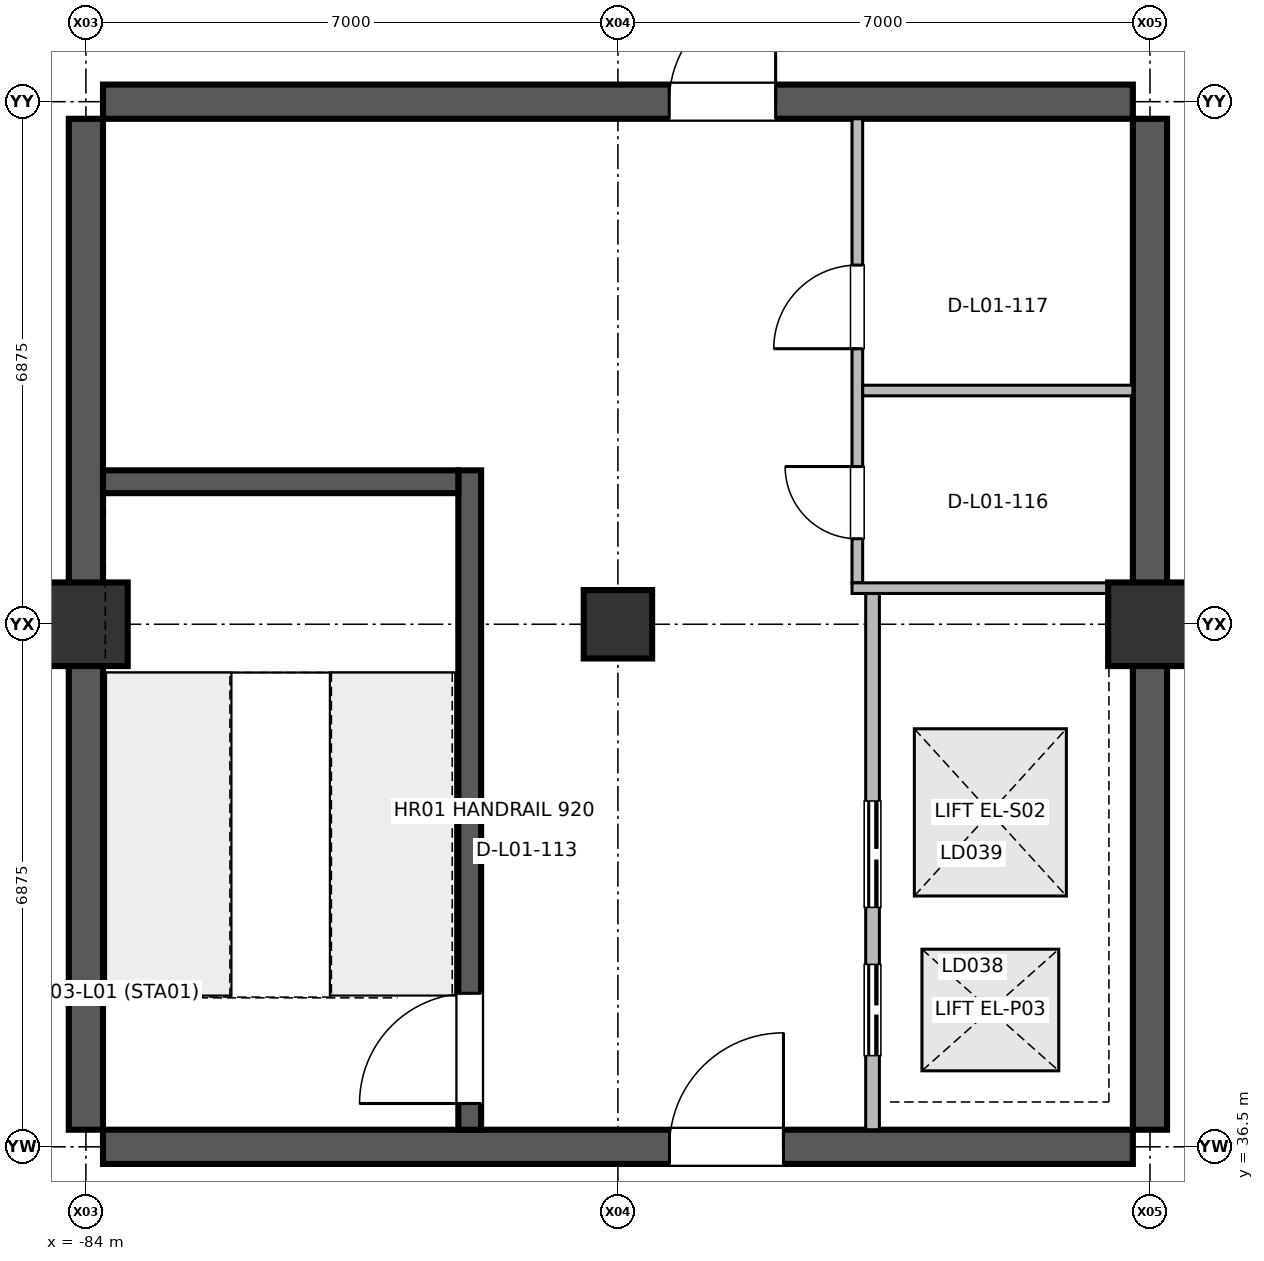
"""IFC4 building model, lengths in metres.
Left out: names, types, materials, properties, quantities, classifications, styles, units other than length and angle.
Written with IfcOpenShell. Run it as: python <this file> out.ifc"""

import sys

from ifc_helpers import new_model, si_unit, direction, frame, frame_2d, origin, origin_2d, place, context, subcontext, project, spatial, rectangle, extrude, element, fill, save


model = new_model("IFC4")
c1 = context("Model", 3, precision=1e-05, world=origin(), true_north=direction((0.0, 1.0)))
c2 = subcontext(c1, "Body", "Model", "MODEL_VIEW")
j1 = project(units=[si_unit("LENGTHUNIT", "METRE"), si_unit("PLANEANGLEUNIT", "RADIAN")], contexts=[c1])
p1 = place(None, origin())
s1 = spatial("IfcSite", under=j1, at=p1, CompositionType="ELEMENT")
p2 = place(p1, origin())
s2 = spatial("IfcBuilding", under=s1, at=p2, CompositionType="ELEMENT")
p3 = place(p2, origin())
s3 = spatial("IfcBuildingStorey", under=s2, at=p3, CompositionType="ELEMENT", Elevation=0.0)
p4 = place(p3, frame((-84.0, 43.375, 0.0), z_axis=(0.0, 0.0, 1.0), x_axis=(1.0, 0.0, 0.0)))
e1 = element("IfcColumn", 1, at=p4, inside=s3, PredefinedType="COLUMN", context=c2, shape_type="SweptSolid", body=[
    extrude(rectangle(XDim=1.1, YDim=1.1, at=origin_2d()), origin(), (0.0, 0.0, 1.0), 5.998),
])
p5 = place(p3, frame((-77.0, 43.375, 0.0), z_axis=(0.0, 0.0, 1.0), x_axis=(1.0, 0.0, 0.0)))
e2 = element("IfcColumn", 2, at=p5, inside=s3, PredefinedType="COLUMN", context=c2, shape_type="SweptSolid", body=[
    extrude(rectangle(XDim=0.9, YDim=0.9, at=origin_2d()), origin(), (0.0, 0.0, 1.0), 5.998),
])
p6 = place(p3, frame((-70.0, 43.375, 0.0), z_axis=(0.0, 0.0, 1.0), x_axis=(1.0, 0.0, 0.0)))
e3 = element("IfcColumn", 3, at=p6, inside=s3, PredefinedType="COLUMN", context=c2, shape_type="SweptSolid", body=[
    extrude(rectangle(XDim=1.1, YDim=1.1, at=origin_2d()), origin(), (0.0, 0.0, 1.0), 5.998),
])
for number, where, z_axis, x_axis in (
    (4, (-84.0, 36.725, 0.0), (0.0, 0.0, 1.0), (0.0, 1.0, 0.0)),
    (5, (-70.0, 36.725, 0.0), (0.0, 0.0, 1.0), (0.0, 1.0, 0.0)),
):
    element("IfcWall", number, at=place(p3, frame(where, z_axis=z_axis, x_axis=x_axis)), inside=s3, PredefinedType="SHEAR", context=c2, shape_type="SweptSolid", body=[
        extrude(rectangle(XDim=13.3, YDim=0.45, at=frame_2d((6.65, 0.0))), origin(), (0.0, 0.0, 1.0), 5.78),
    ])
p7 = place(p3, frame((-83.775, 36.5, 0.0), z_axis=(0.0, 0.0, 1.0), x_axis=(1.0, 0.0, 0.0)))
e6 = element("IfcWall", 6, at=p7, inside=s3, PredefinedType="SHEAR", context=c2, shape_type="SweptSolid", body=[
    extrude(rectangle(XDim=13.55, YDim=0.45, at=frame_2d((6.775, 0.0))), origin(), (0.0, 0.0, 1.0), 5.78),
])
p8 = place(p7, frame((7.453, 0.0, 0.0)))
e7 = element("IfcOpeningElement", 7, at=p8, cuts=e6, PredefinedType="OPENING", context=c2, shape_type="SweptSolid", body=[
    extrude(rectangle(XDim=1.5, YDim=2.2, at=frame_2d((0.75, 1.1))), frame((0.0, 0.235, 0.0), z_axis=(0.0, -1.0, 0.0), x_axis=(1.0, 0.0, 0.0)), (0.0, 0.0, 1.0), 0.47),
])
p9 = place(p3, frame((-83.775, 50.25, 0.0), z_axis=(0.0, 0.0, 1.0), x_axis=(1.0, 0.0, 0.0)))
e8 = element("IfcWall", 8, at=p9, inside=s3, PredefinedType="SHEAR", context=c2, shape_type="SweptSolid", body=[
    extrude(rectangle(XDim=13.55, YDim=0.45, at=frame_2d((6.775, 0.0))), origin(), (0.0, 0.0, 1.0), 5.78),
])
p10 = place(p9, frame((7.45, 0.0, 0.0)))
e9 = element("IfcOpeningElement", 9, at=p10, cuts=e8, PredefinedType="OPENING", context=c2, shape_type="SweptSolid", body=[
    extrude(rectangle(XDim=1.4, YDim=2.2, at=frame_2d((0.7, 1.1))), frame((0.0, 0.235, 0.0), z_axis=(0.0, -1.0, 0.0), x_axis=(1.0, 0.0, 0.0)), (0.0, 0.0, 1.0), 0.47),
])
p11 = place(p3, frame((-78.95, 36.725, 0.0), z_axis=(0.0, 0.0, 1.0), x_axis=(0.0, 1.0, 0.0)))
e10 = element("IfcWall", 10, at=p11, inside=s3, PredefinedType="SHEAR", context=c2, shape_type="SweptSolid", body=[
    extrude(rectangle(XDim=8.675, YDim=0.3, at=frame_2d((4.337, 0.0))), origin(), (0.0, 0.0, 1.0), 5.78),
])
p12 = place(p11, frame((0.345, 0.0, 0.0)))
e11 = element("IfcOpeningElement", 11, at=p12, cuts=e10, PredefinedType="OPENING", context=c2, shape_type="SweptSolid", body=[
    extrude(rectangle(XDim=1.45, YDim=2.2, at=frame_2d((0.725, 1.1))), frame((0.0, 0.16, 0.0), z_axis=(0.0, -1.0, 0.0), x_axis=(1.0, 0.0, 0.0)), (0.0, 0.0, 1.0), 0.32),
])
p13 = place(p3, frame((-73.65, 36.725, 0.0), z_axis=(0.0, 0.0, 1.0), x_axis=(0.0, 1.0, 0.0)))
e12 = element("IfcWall", 12, at=p13, inside=s3, PredefinedType="PARTITIONING", context=c2, shape_type="SweptSolid", body=[
    extrude(rectangle(XDim=7.055, YDim=0.18, at=frame_2d((3.527, 0.0))), origin(), (0.0, 0.0, 1.0), 5.02),
])
p14 = place(p13, frame((0.975, 0.0, 0.0)))
e13 = element("IfcOpeningElement", 13, at=p14, cuts=e12, PredefinedType="OPENING", context=c2, shape_type="SweptSolid", body=[
    extrude(rectangle(XDim=1.2, YDim=2.25, at=frame_2d((0.6, 1.125))), frame((0.0, 0.1, 0.0), z_axis=(0.0, -1.0, 0.0), x_axis=(1.0, 0.0, 0.0)), (0.0, 0.0, 1.0), 0.2),
])
p15 = place(p13, frame((2.925, 0.0, 0.0)))
e14 = element("IfcOpeningElement", 14, at=p15, cuts=e12, PredefinedType="OPENING", context=c2, shape_type="SweptSolid", body=[
    extrude(rectangle(XDim=1.4, YDim=2.3, at=frame_2d((0.7, 1.15))), frame((0.0, 0.1, 0.0), z_axis=(0.0, -1.0, 0.0), x_axis=(1.0, 0.0, 0.0)), (0.0, 0.0, 1.0), 0.2),
])
p16 = place(p3, frame((-73.85, 43.92, 0.0), z_axis=(0.0, 0.0, 1.0), x_axis=(0.0, 1.0, 0.0)))
e15 = element("IfcWall", 15, at=p16, inside=s3, PredefinedType="PARTITIONING", context=c2, shape_type="SweptSolid", body=[
    extrude(rectangle(XDim=6.105, YDim=0.14, at=frame_2d((3.052, 0.0))), origin(), (0.0, 0.0, 1.0), 5.02),
])
p17 = place(p16, frame((0.58, 0.0, 0.0)))
e16 = element("IfcOpeningElement", 16, at=p17, cuts=e15, PredefinedType="OPENING", context=c2, shape_type="SweptSolid", body=[
    extrude(rectangle(XDim=0.95, YDim=2.15, at=frame_2d((0.475, 1.075))), frame((0.0, 0.08, 0.0), z_axis=(0.0, -1.0, 0.0), x_axis=(1.0, 0.0, 0.0)), (0.0, 0.0, 1.0), 0.16),
])
p18 = place(p16, frame((3.08, 0.0, 0.0)))
e17 = element("IfcOpeningElement", 17, at=p18, cuts=e15, PredefinedType="OPENING", context=c2, shape_type="SweptSolid", body=[
    extrude(rectangle(XDim=1.1, YDim=2.15, at=frame_2d((0.55, 1.075))), frame((0.0, 0.08, 0.0), z_axis=(0.0, -1.0, 0.0), x_axis=(1.0, 0.0, 0.0)), (0.0, 0.0, 1.0), 0.16),
])
p19 = place(p3, frame((-73.92, 43.85, 0.0), z_axis=(0.0, 0.0, 1.0), x_axis=(1.0, 0.0, 0.0)))
e18 = element("IfcWall", 18, at=p19, inside=s3, PredefinedType="PARTITIONING", context=c2, shape_type="SweptSolid", body=[
    extrude(rectangle(XDim=3.695, YDim=0.14, at=frame_2d((1.847, 0.0))), origin(), (0.0, 0.0, 1.0), 5.02),
])
p20 = place(p3, frame((-73.78, 46.45, 0.0), z_axis=(0.0, 0.0, 1.0), x_axis=(1.0, 0.0, 0.0)))
e19 = element("IfcWall", 19, at=p20, inside=s3, PredefinedType="PARTITIONING", context=c2, shape_type="SweptSolid", body=[
    extrude(rectangle(XDim=3.555, YDim=0.14, at=frame_2d((1.777, 0.0))), origin(), (0.0, 0.0, 1.0), 5.02),
])
p21 = place(p3, frame((-83.775, 45.25, 0.0), z_axis=(0.0, 0.0, 1.0), x_axis=(1.0, 0.0, 0.0)))
e20 = element("IfcWall", 20, at=p21, inside=s3, PredefinedType="SHEAR", context=c2, shape_type="SweptSolid", body=[
    extrude(rectangle(XDim=4.675, YDim=0.3, at=frame_2d((2.337, 0.0))), origin(), (0.0, 0.0, 1.0), 5.78),
])
p22 = place(p10, origin())
e21 = element("IfcDoor", 21, at=p22, inside=s3, OperationType="SINGLE_SWING_RIGHT", PredefinedType="DOOR", context=c2, shape_type="SweptSolid", body=[
    extrude(rectangle(XDim=1.4, YDim=2.2, at=frame_2d((0.7, 1.1))), frame((0.0, 0.025, 0.0), z_axis=(0.0, -1.0, 0.0), x_axis=(1.0, 0.0, 0.0)), (0.0, 0.0, 1.0), 0.05),
])
fill(e9, e21)
p23 = place(p8, origin())
e22 = element("IfcDoor", 22, at=p23, inside=s3, OperationType="SINGLE_SWING_RIGHT", PredefinedType="DOOR", context=c2, shape_type="SweptSolid", body=[
    extrude(rectangle(XDim=1.5, YDim=2.2, at=frame_2d((0.75, 1.1))), frame((0.0, 0.025, 0.0), z_axis=(0.0, -1.0, 0.0), x_axis=(1.0, 0.0, 0.0)), (0.0, 0.0, 1.0), 0.05),
])
fill(e7, e22)
p24 = place(p12, origin())
e23 = element("IfcDoor", 23, at=p24, inside=s3, OperationType="SINGLE_SWING_LEFT", PredefinedType="DOOR", context=c2, shape_type="SweptSolid", body=[
    extrude(rectangle(XDim=1.45, YDim=2.2, at=frame_2d((0.725, 1.1))), frame((0.0, 0.025, 0.0), z_axis=(0.0, -1.0, 0.0), x_axis=(1.0, 0.0, 0.0)), (0.0, 0.0, 1.0), 0.05),
])
fill(e11, e23)
p25 = place(p14, origin())
e24 = element("IfcDoor", 24, at=p25, inside=s3, OperationType="DOUBLE_DOOR_SLIDING", PredefinedType="DOOR", context=c2, shape_type="SweptSolid", body=[
    extrude(rectangle(XDim=1.2, YDim=2.25, at=frame_2d((0.6, 1.125))), frame((0.0, 0.025, 0.0), z_axis=(0.0, -1.0, 0.0), x_axis=(1.0, 0.0, 0.0)), (0.0, 0.0, 1.0), 0.05),
])
fill(e13, e24)
p26 = place(p15, origin())
e25 = element("IfcDoor", 25, at=p26, inside=s3, OperationType="DOUBLE_DOOR_SLIDING", PredefinedType="DOOR", context=c2, shape_type="SweptSolid", body=[
    extrude(rectangle(XDim=1.4, YDim=2.3, at=frame_2d((0.7, 1.15))), frame((0.0, 0.025, 0.0), z_axis=(0.0, -1.0, 0.0), x_axis=(1.0, 0.0, 0.0)), (0.0, 0.0, 1.0), 0.05),
])
fill(e14, e25)
p27 = place(p17, origin())
e26 = element("IfcDoor", 26, at=p27, inside=s3, OperationType="SINGLE_SWING_RIGHT", PredefinedType="DOOR", context=c2, shape_type="SweptSolid", body=[
    extrude(rectangle(XDim=0.95, YDim=2.15, at=frame_2d((0.475, 1.075))), frame((0.0, 0.025, 0.0), z_axis=(0.0, -1.0, 0.0), x_axis=(1.0, 0.0, 0.0)), (0.0, 0.0, 1.0), 0.05),
])
fill(e16, e26)
p28 = place(p18, origin())
e27 = element("IfcDoor", 27, at=p28, inside=s3, OperationType="SINGLE_SWING_LEFT", PredefinedType="DOOR", context=c2, shape_type="SweptSolid", body=[
    extrude(rectangle(XDim=1.1, YDim=2.15, at=frame_2d((0.55, 1.075))), frame((0.0, 0.025, 0.0), z_axis=(0.0, -1.0, 0.0), x_axis=(1.0, 0.0, 0.0)), (0.0, 0.0, 1.0), 0.05),
])
fill(e17, e27)
save(model, sys.argv[1])
